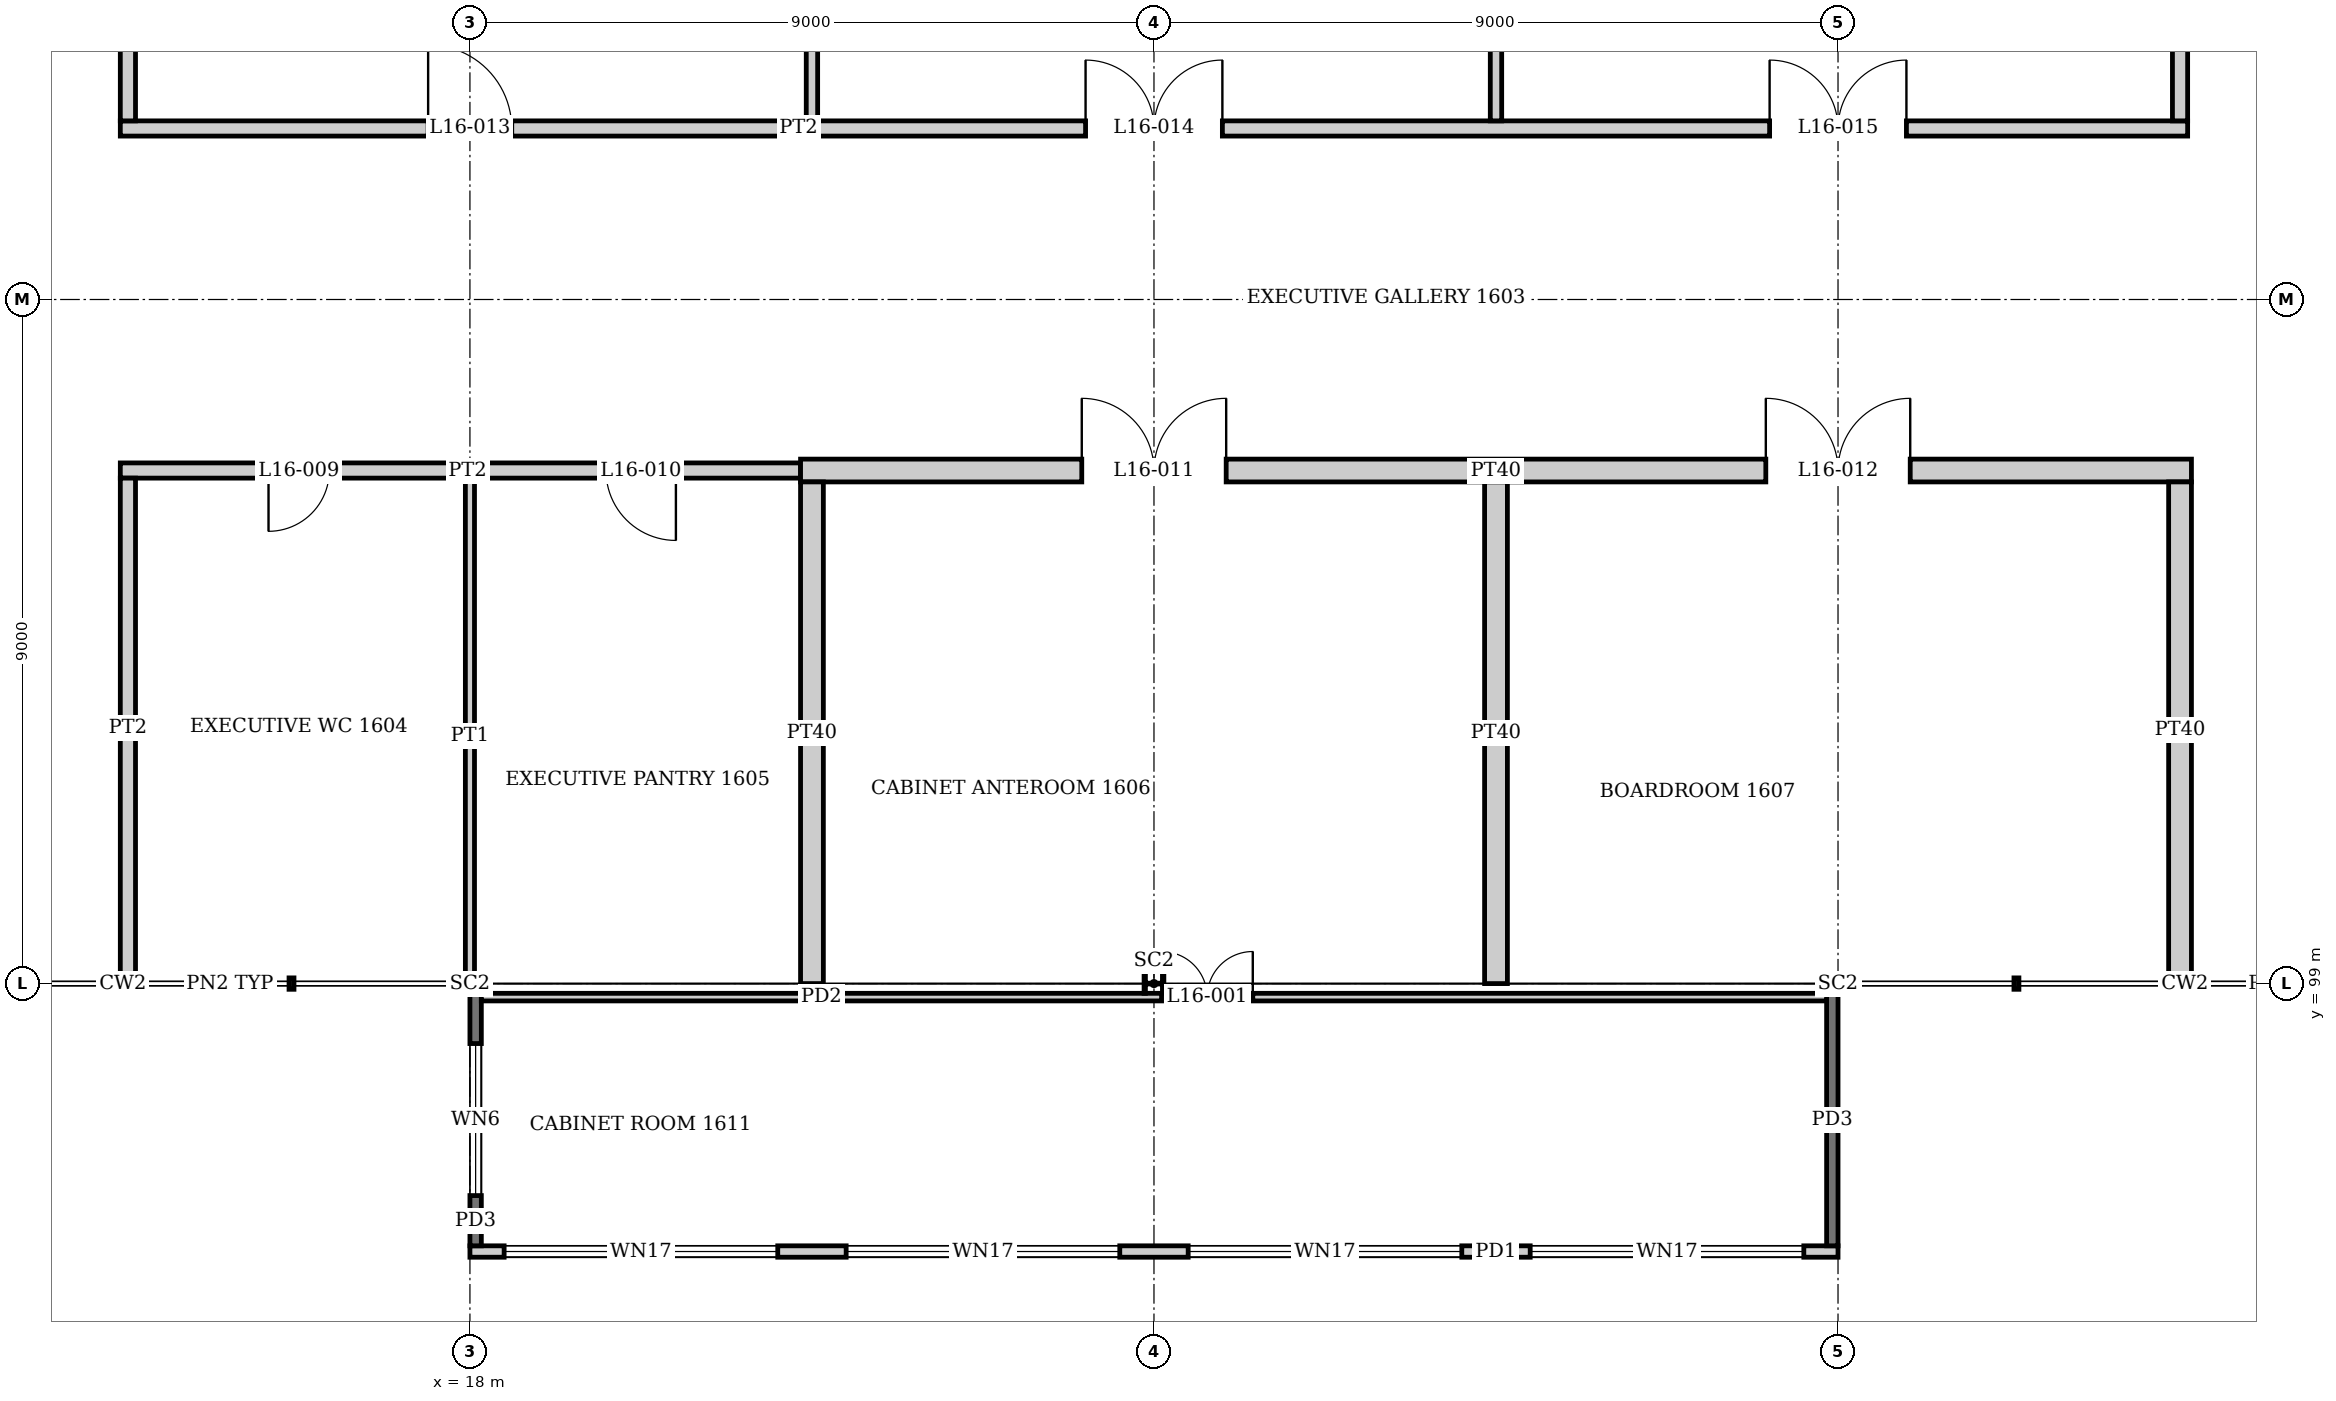
"""IFC4 building model, lengths in metres.
Left out: names, types, materials, properties, quantities, classifications, styles, units other than length and angle.
Written with IfcOpenShell. Run it as: python <this file> out.ifc"""

import sys

from ifc_helpers import new_model, si_unit, direction, frame, frame_2d, origin, origin_2d, place, context, subcontext, project, spatial, rectangle, i_section, extrude, element, fill, save


model = new_model("IFC4")
c1 = context("Model", 3, precision=1e-05, world=origin(), true_north=direction((0.0, 1.0)))
c2 = subcontext(c1, "Body", "Model", "MODEL_VIEW")
j1 = project(units=[si_unit("LENGTHUNIT", "METRE"), si_unit("PLANEANGLEUNIT", "RADIAN")], contexts=[c1])
p1 = place(None, origin())
s1 = spatial("IfcSite", under=j1, at=p1, CompositionType="ELEMENT")
p2 = place(p1, origin())
s2 = spatial("IfcBuilding", under=s1, at=p2, CompositionType="ELEMENT")
p3 = place(p2, frame((0.0, 0.0, 67.2)))
s3 = spatial("IfcBuildingStorey", under=s2, at=p3, CompositionType="ELEMENT", Elevation=67.2)
for number, where, z_axis, x_axis in (
    (1, (18.0, 99.0, 0.0), (0.0, 0.0, 1.0), (0.0, 1.0, 0.0)),
    (2, (27.0, 99.0, 0.0), (0.0, 0.0, 1.0), (0.0, 1.0, 0.0)),
    (3, (36.0, 99.0, 0.0), (0.0, 0.0, 1.0), (0.0, 1.0, 0.0)),
):
    element("IfcColumn", number, at=place(p3, frame(where, z_axis=z_axis, x_axis=x_axis)), inside=s3, PredefinedType="COLUMN", context=c2, shape_type="SweptSolid", body=[
        extrude(i_section(OverallWidth=0.256, OverallDepth=0.26, WebThickness=0.01, FlangeThickness=0.017, at=origin_2d()), origin(), (0.0, 0.0, 1.0), 4.0),
    ])
p4 = place(p3, frame((18.0, 95.475, 0.0), z_axis=(0.0, 0.0, 1.0), x_axis=(1.0, 0.0, 0.0)))
e4 = element("IfcWall", 4, at=p4, inside=s3, PredefinedType="SOLIDWALL", context=c2, shape_type="SweptSolid", body=[
    extrude(rectangle(XDim=18.0, YDim=0.15, at=frame_2d((9.0, 0.0))), origin(), (0.0, 0.0, 1.0), 2.6),
])
p5 = place(p4, frame((0.45, 0.0, 0.6)))
e5 = element("IfcOpeningElement", 5, at=p5, cuts=e4, PredefinedType="OPENING", context=c2, shape_type="SweptSolid", body=[
    extrude(rectangle(XDim=3.6, YDim=1.8, at=frame_2d((1.8, 0.9))), frame((0.0, 0.085, 0.0), z_axis=(0.0, -1.0, 0.0), x_axis=(1.0, 0.0, 0.0)), (0.0, 0.0, 1.0), 0.17),
])
p6 = place(p4, frame((4.95, 0.0, 0.6)))
e6 = element("IfcOpeningElement", 6, at=p6, cuts=e4, PredefinedType="OPENING", context=c2, shape_type="SweptSolid", body=[
    extrude(rectangle(XDim=3.6, YDim=1.8, at=frame_2d((1.8, 0.9))), frame((0.0, 0.085, 0.0), z_axis=(0.0, -1.0, 0.0), x_axis=(1.0, 0.0, 0.0)), (0.0, 0.0, 1.0), 0.17),
])
p7 = place(p4, frame((9.45, 0.0, 0.6)))
e7 = element("IfcOpeningElement", 7, at=p7, cuts=e4, PredefinedType="OPENING", context=c2, shape_type="SweptSolid", body=[
    extrude(rectangle(XDim=3.6, YDim=1.8, at=frame_2d((1.8, 0.9))), frame((0.0, 0.085, 0.0), z_axis=(0.0, -1.0, 0.0), x_axis=(1.0, 0.0, 0.0)), (0.0, 0.0, 1.0), 0.17),
])
p8 = place(p4, frame((13.95, 0.0, 0.6)))
e8 = element("IfcOpeningElement", 8, at=p8, cuts=e4, PredefinedType="OPENING", context=c2, shape_type="SweptSolid", body=[
    extrude(rectangle(XDim=3.6, YDim=1.8, at=frame_2d((1.8, 0.9))), frame((0.0, 0.085, 0.0), z_axis=(0.0, -1.0, 0.0), x_axis=(1.0, 0.0, 0.0)), (0.0, 0.0, 1.0), 0.17),
])
p9 = place(p3, frame((18.075, 95.55, -0.15), z_axis=(0.0, 0.0, 1.0), x_axis=(0.0, 1.0, 0.0)))
e9 = element("IfcWall", 9, at=p9, inside=s3, PredefinedType="SOLIDWALL", context=c2, shape_type="SweptSolid", body=[
    extrude(rectangle(XDim=3.322, YDim=0.15, at=frame_2d((1.661, 0.0))), origin(), (0.0, 0.0, 1.0), 2.75),
])
p10 = place(p9, frame((0.661, 0.0, 1.05)))
e10 = element("IfcOpeningElement", 10, at=p10, cuts=e9, PredefinedType="OPENING", context=c2, shape_type="SweptSolid", body=[
    extrude(rectangle(XDim=2.0, YDim=1.4, at=frame_2d((1.0, 0.7))), frame((0.0, 0.085, 0.0), z_axis=(0.0, -1.0, 0.0), x_axis=(1.0, 0.0, 0.0)), (0.0, 0.0, 1.0), 0.17),
])
p11 = place(p3, frame((35.925, 95.55, -0.15), z_axis=(0.0, 0.0, 1.0), x_axis=(0.0, 1.0, 0.0)))
e11 = element("IfcWall", 11, at=p11, inside=s3, PredefinedType="SOLIDWALL", context=c2, shape_type="SweptSolid", body=[
    extrude(rectangle(XDim=3.322, YDim=0.15, at=frame_2d((1.661, 0.0))), origin(), (0.0, 0.0, 1.0), 2.75),
])
p12 = place(p3, frame((18.15, 98.822, 0.0), z_axis=(0.0, 0.0, 1.0), x_axis=(1.0, 0.0, 0.0)))
e12 = element("IfcWall", 12, at=p12, inside=s3, PredefinedType="PARTITIONING", context=c2, shape_type="SweptSolid", body=[
    extrude(rectangle(XDim=17.7, YDim=0.1, at=frame_2d((8.85, 0.0))), origin(), (0.0, 0.0, 1.0), 2.6),
])
p13 = place(p12, frame((8.95, 0.0, 0.0)))
e13 = element("IfcOpeningElement", 13, at=p13, cuts=e12, PredefinedType="OPENING", context=c2, shape_type="SweptSolid", body=[
    extrude(rectangle(XDim=1.2, YDim=2.1, at=frame_2d((0.6, 1.05))), frame((0.0, 0.06, 0.0), z_axis=(0.0, -1.0, 0.0), x_axis=(1.0, 0.0, 0.0)), (0.0, 0.0, 1.0), 0.12),
])
p14 = place(p3, frame((13.4, 105.75, 0.0), z_axis=(0.0, 0.0, 1.0), x_axis=(1.0, 0.0, 0.0)))
e14 = element("IfcWall", 14, at=p14, inside=s3, PredefinedType="PARTITIONING", context=c2, shape_type="SweptSolid", body=[
    extrude(rectangle(XDim=8.95, YDim=0.2, at=frame_2d((4.475, 0.0))), origin(), (0.0, 0.0, 1.0), 2.9),
])
p15 = place(p14, frame((1.95, 0.0, 0.0)))
e15 = element("IfcOpeningElement", 15, at=p15, cuts=e14, PredefinedType="OPENING", context=c2, shape_type="SweptSolid", body=[
    extrude(rectangle(XDim=0.8, YDim=2.1, at=frame_2d((0.4, 1.05))), frame((0.0, 0.11, 0.0), z_axis=(0.0, -1.0, 0.0), x_axis=(1.0, 0.0, 0.0)), (0.0, 0.0, 1.0), 0.22),
])
p16 = place(p14, frame((6.39, 0.0, 0.0)))
e16 = element("IfcOpeningElement", 16, at=p16, cuts=e14, PredefinedType="OPENING", context=c2, shape_type="SweptSolid", body=[
    extrude(rectangle(XDim=0.92, YDim=2.1, at=frame_2d((0.46, 1.05))), frame((0.0, 0.11, 0.0), z_axis=(0.0, -1.0, 0.0), x_axis=(1.0, 0.0, 0.0)), (0.0, 0.0, 1.0), 0.22),
])
p17 = place(p3, frame((22.35, 105.75, 0.0), z_axis=(0.0, 0.0, 1.0), x_axis=(1.0, 0.0, 0.0)))
e17 = element("IfcWall", 17, at=p17, inside=s3, PredefinedType="PARTITIONING", context=c2, shape_type="SweptSolid", body=[
    extrude(rectangle(XDim=18.3, YDim=0.3, at=frame_2d((9.15, 0.0))), origin(), (0.0, 0.0, 1.0), 2.9),
])
p18 = place(p17, frame((3.7, 0.0, 0.0)))
e18 = element("IfcOpeningElement", 18, at=p18, cuts=e17, PredefinedType="OPENING", context=c2, shape_type="SweptSolid", body=[
    extrude(rectangle(XDim=1.9, YDim=2.4, at=frame_2d((0.95, 1.2))), frame((0.0, 0.16, 0.0), z_axis=(0.0, -1.0, 0.0), x_axis=(1.0, 0.0, 0.0)), (0.0, 0.0, 1.0), 0.32),
])
p19 = place(p17, frame((12.7, 0.0, 0.0)))
e19 = element("IfcOpeningElement", 19, at=p19, cuts=e17, PredefinedType="OPENING", context=c2, shape_type="SweptSolid", body=[
    extrude(rectangle(XDim=1.9, YDim=2.4, at=frame_2d((0.95, 1.2))), frame((0.0, 0.16, 0.0), z_axis=(0.0, -1.0, 0.0), x_axis=(1.0, 0.0, 0.0)), (0.0, 0.0, 1.0), 0.32),
])
p20 = place(p3, frame((13.4, 110.25, 0.0), z_axis=(0.0, 0.0, 1.0), x_axis=(1.0, 0.0, 0.0)))
e20 = element("IfcWall", 20, at=p20, inside=s3, PredefinedType="PARTITIONING", context=c2, shape_type="SweptSolid", body=[
    extrude(rectangle(XDim=27.2, YDim=0.2, at=frame_2d((13.6, 0.0))), origin(), (0.0, 0.0, 1.0), 2.9),
])
p21 = place(p20, frame((4.05, 0.0, 0.0)))
e21 = element("IfcOpeningElement", 21, at=p21, cuts=e20, PredefinedType="OPENING", context=c2, shape_type="SweptSolid", body=[
    extrude(rectangle(XDim=1.1, YDim=2.4, at=frame_2d((0.55, 1.2))), frame((0.0, 0.11, 0.0), z_axis=(0.0, -1.0, 0.0), x_axis=(1.0, 0.0, 0.0)), (0.0, 0.0, 1.0), 0.22),
])
p22 = place(p20, frame((12.7, 0.0, 0.0)))
e22 = element("IfcOpeningElement", 22, at=p22, cuts=e20, PredefinedType="OPENING", context=c2, shape_type="SweptSolid", body=[
    extrude(rectangle(XDim=1.8, YDim=2.1, at=frame_2d((0.9, 1.05))), frame((0.0, 0.11, 0.0), z_axis=(0.0, -1.0, 0.0), x_axis=(1.0, 0.0, 0.0)), (0.0, 0.0, 1.0), 0.22),
])
p23 = place(p20, frame((21.7, 0.0, 0.0)))
e23 = element("IfcOpeningElement", 23, at=p23, cuts=e20, PredefinedType="OPENING", context=c2, shape_type="SweptSolid", body=[
    extrude(rectangle(XDim=1.8, YDim=2.1, at=frame_2d((0.9, 1.05))), frame((0.0, 0.11, 0.0), z_axis=(0.0, -1.0, 0.0), x_axis=(1.0, 0.0, 0.0)), (0.0, 0.0, 1.0), 0.22),
])
p24 = place(p3, frame((13.5, 99.075, 0.0), z_axis=(0.0, 0.0, 1.0), x_axis=(0.0, 1.0, 0.0)))
e24 = element("IfcWall", 24, at=p24, inside=s3, PredefinedType="PARTITIONING", context=c2, shape_type="SweptSolid", body=[
    extrude(rectangle(XDim=6.575, YDim=0.2, at=frame_2d((3.288, 0.0))), origin(), (0.0, 0.0, 1.0), 2.9),
])
p25 = place(p3, frame((13.5, 110.35, 0.0), z_axis=(0.0, 0.0, 1.0), x_axis=(0.0, 1.0, 0.0)))
e25 = element("IfcWall", 25, at=p25, inside=s3, PredefinedType="PARTITIONING", context=c2, shape_type="SweptSolid", body=[
    extrude(rectangle(XDim=6.56, YDim=0.2, at=frame_2d((3.28, 0.0))), origin(), (0.0, 0.0, 1.0), 2.9),
])
p26 = place(p3, frame((18.0, 98.872, 0.0), z_axis=(0.0, 0.0, 1.0), x_axis=(0.0, 1.0, 0.0)))
e26 = element("IfcWall", 26, at=p26, inside=s3, PredefinedType="PARTITIONING", context=c2, shape_type="SweptSolid", body=[
    extrude(rectangle(XDim=6.778, YDim=0.12, at=frame_2d((3.389, 0.0))), origin(), (0.0, 0.0, 1.0), 2.9),
])
p27 = place(p3, frame((22.5, 99.0, 0.0), z_axis=(0.0, 0.0, 1.0), x_axis=(0.0, 1.0, 0.0)))
e27 = element("IfcWall", 27, at=p27, inside=s3, PredefinedType="PARTITIONING", context=c2, shape_type="SweptSolid", body=[
    extrude(rectangle(XDim=6.6, YDim=0.3, at=frame_2d((3.3, 0.0))), origin(), (0.0, 0.0, 1.0), 2.9),
])
p28 = place(p3, frame((22.5, 110.35, 0.0), z_axis=(0.0, 0.0, 1.0), x_axis=(0.0, 1.0, 0.0)))
e28 = element("IfcWall", 28, at=p28, inside=s3, PredefinedType="PARTITIONING", context=c2, shape_type="SweptSolid", body=[
    extrude(rectangle(XDim=6.65, YDim=0.15, at=frame_2d((3.325, 0.0))), origin(), (0.0, 0.0, 1.0), 2.9),
])
p29 = place(p3, frame((31.5, 99.0, 0.0), z_axis=(0.0, 0.0, 1.0), x_axis=(0.0, 1.0, 0.0)))
e29 = element("IfcWall", 29, at=p29, inside=s3, PredefinedType="PARTITIONING", context=c2, shape_type="SweptSolid", body=[
    extrude(rectangle(XDim=6.6, YDim=0.3, at=frame_2d((3.3, 0.0))), origin(), (0.0, 0.0, 1.0), 2.9),
])
p30 = place(p3, frame((31.5, 110.35, 0.0), z_axis=(0.0, 0.0, 1.0), x_axis=(0.0, 1.0, 0.0)))
e30 = element("IfcWall", 30, at=p30, inside=s3, PredefinedType="PARTITIONING", context=c2, shape_type="SweptSolid", body=[
    extrude(rectangle(XDim=6.65, YDim=0.15, at=frame_2d((3.325, 0.0))), origin(), (0.0, 0.0, 1.0), 2.9),
])
p31 = place(p3, frame((40.5, 99.075, 0.0), z_axis=(0.0, 0.0, 1.0), x_axis=(0.0, 1.0, 0.0)))
e31 = element("IfcWall", 31, at=p31, inside=s3, PredefinedType="PARTITIONING", context=c2, shape_type="SweptSolid", body=[
    extrude(rectangle(XDim=6.525, YDim=0.3, at=frame_2d((3.263, 0.0))), origin(), (0.0, 0.0, 1.0), 2.9),
])
p32 = place(p3, frame((40.5, 110.35, 0.0), z_axis=(0.0, 0.0, 1.0), x_axis=(0.0, 1.0, 0.0)))
e32 = element("IfcWall", 32, at=p32, inside=s3, PredefinedType="PARTITIONING", context=c2, shape_type="SweptSolid", body=[
    extrude(rectangle(XDim=6.56, YDim=0.2, at=frame_2d((3.28, 0.0))), origin(), (0.0, 0.0, 1.0), 2.9),
])
p33 = place(p5, origin())
e33 = element("IfcWindow", 33, at=p33, inside=s3, PartitioningType="SINGLE_PANEL", PredefinedType="WINDOW", context=c2, shape_type="SweptSolid", body=[
    extrude(rectangle(XDim=3.6, YDim=1.8, at=frame_2d((1.8, 0.9))), frame((0.0, 0.03, 0.0), z_axis=(0.0, -1.0, 0.0), x_axis=(1.0, 0.0, 0.0)), (0.0, 0.0, 1.0), 0.06),
])
fill(e5, e33)
p34 = place(p6, origin())
e34 = element("IfcWindow", 34, at=p34, inside=s3, PartitioningType="SINGLE_PANEL", PredefinedType="WINDOW", context=c2, shape_type="SweptSolid", body=[
    extrude(rectangle(XDim=3.6, YDim=1.8, at=frame_2d((1.8, 0.9))), frame((0.0, 0.03, 0.0), z_axis=(0.0, -1.0, 0.0), x_axis=(1.0, 0.0, 0.0)), (0.0, 0.0, 1.0), 0.06),
])
fill(e6, e34)
p35 = place(p7, origin())
e35 = element("IfcWindow", 35, at=p35, inside=s3, PartitioningType="SINGLE_PANEL", PredefinedType="WINDOW", context=c2, shape_type="SweptSolid", body=[
    extrude(rectangle(XDim=3.6, YDim=1.8, at=frame_2d((1.8, 0.9))), frame((0.0, 0.03, 0.0), z_axis=(0.0, -1.0, 0.0), x_axis=(1.0, 0.0, 0.0)), (0.0, 0.0, 1.0), 0.06),
])
fill(e7, e35)
p36 = place(p8, origin())
e36 = element("IfcWindow", 36, at=p36, inside=s3, PartitioningType="SINGLE_PANEL", PredefinedType="WINDOW", context=c2, shape_type="SweptSolid", body=[
    extrude(rectangle(XDim=3.6, YDim=1.8, at=frame_2d((1.8, 0.9))), frame((0.0, 0.03, 0.0), z_axis=(0.0, -1.0, 0.0), x_axis=(1.0, 0.0, 0.0)), (0.0, 0.0, 1.0), 0.06),
])
fill(e8, e36)
p37 = place(p10, origin())
e37 = element("IfcWindow", 37, at=p37, inside=s3, PartitioningType="SINGLE_PANEL", PredefinedType="WINDOW", context=c2, shape_type="SweptSolid", body=[
    extrude(rectangle(XDim=2.0, YDim=1.4, at=frame_2d((1.0, 0.7))), frame((0.0, 0.03, 0.0), z_axis=(0.0, -1.0, 0.0), x_axis=(1.0, 0.0, 0.0)), (0.0, 0.0, 1.0), 0.06),
])
fill(e10, e37)
p38 = place(p13, origin())
e38 = element("IfcDoor", 38, at=p38, inside=s3, OperationType="DOUBLE_DOOR_SINGLE_SWING", PredefinedType="DOOR", context=c2, shape_type="SweptSolid", body=[
    extrude(rectangle(XDim=1.2, YDim=2.1, at=frame_2d((0.6, 1.05))), frame((0.0, 0.025, 0.0), z_axis=(0.0, -1.0, 0.0), x_axis=(1.0, 0.0, 0.0)), (0.0, 0.0, 1.0), 0.05),
])
fill(e13, e38)
p39 = place(p15, frame((0.8, 0.0, 0.0), z_axis=(0.0, 0.0, 1.0), x_axis=(-1.0, 0.0, 0.0)))
e39 = element("IfcDoor", 39, at=p39, inside=s3, OperationType="SINGLE_SWING_RIGHT", PredefinedType="DOOR", context=c2, shape_type="SweptSolid", body=[
    extrude(rectangle(XDim=0.8, YDim=2.1, at=frame_2d((0.4, 1.05))), frame((0.0, 0.025, 0.0), z_axis=(0.0, -1.0, 0.0), x_axis=(1.0, 0.0, 0.0)), (0.0, 0.0, 1.0), 0.05),
])
fill(e15, e39)
p40 = place(p16, frame((0.92, 0.0, 0.0), z_axis=(0.0, 0.0, 1.0), x_axis=(-1.0, 0.0, 0.0)))
e40 = element("IfcDoor", 40, at=p40, inside=s3, OperationType="SINGLE_SWING_LEFT", PredefinedType="DOOR", context=c2, shape_type="SweptSolid", body=[
    extrude(rectangle(XDim=0.92, YDim=2.1, at=frame_2d((0.46, 1.05))), frame((0.0, 0.025, 0.0), z_axis=(0.0, -1.0, 0.0), x_axis=(1.0, 0.0, 0.0)), (0.0, 0.0, 1.0), 0.05),
])
fill(e16, e40)
p41 = place(p18, origin())
e41 = element("IfcDoor", 41, at=p41, inside=s3, OperationType="DOUBLE_DOOR_SINGLE_SWING", PredefinedType="DOOR", context=c2, shape_type="SweptSolid", body=[
    extrude(rectangle(XDim=1.9, YDim=2.4, at=frame_2d((0.95, 1.2))), frame((0.0, 0.025, 0.0), z_axis=(0.0, -1.0, 0.0), x_axis=(1.0, 0.0, 0.0)), (0.0, 0.0, 1.0), 0.05),
])
fill(e18, e41)
p42 = place(p19, origin())
e42 = element("IfcDoor", 42, at=p42, inside=s3, OperationType="DOUBLE_DOOR_SINGLE_SWING", PredefinedType="DOOR", context=c2, shape_type="SweptSolid", body=[
    extrude(rectangle(XDim=1.9, YDim=2.4, at=frame_2d((0.95, 1.2))), frame((0.0, 0.025, 0.0), z_axis=(0.0, -1.0, 0.0), x_axis=(1.0, 0.0, 0.0)), (0.0, 0.0, 1.0), 0.05),
])
fill(e19, e42)
p43 = place(p21, origin())
e43 = element("IfcDoor", 43, at=p43, inside=s3, OperationType="SINGLE_SWING_LEFT", PredefinedType="DOOR", context=c2, shape_type="SweptSolid", body=[
    extrude(rectangle(XDim=1.1, YDim=2.4, at=frame_2d((0.55, 1.2))), frame((0.0, 0.025, 0.0), z_axis=(0.0, -1.0, 0.0), x_axis=(1.0, 0.0, 0.0)), (0.0, 0.0, 1.0), 0.05),
])
fill(e21, e43)
p44 = place(p22, origin())
e44 = element("IfcDoor", 44, at=p44, inside=s3, OperationType="DOUBLE_DOOR_SINGLE_SWING", PredefinedType="DOOR", context=c2, shape_type="SweptSolid", body=[
    extrude(rectangle(XDim=1.8, YDim=2.1, at=frame_2d((0.9, 1.05))), frame((0.0, 0.025, 0.0), z_axis=(0.0, -1.0, 0.0), x_axis=(1.0, 0.0, 0.0)), (0.0, 0.0, 1.0), 0.05),
])
fill(e22, e44)
p45 = place(p23, origin())
e45 = element("IfcDoor", 45, at=p45, inside=s3, OperationType="DOUBLE_DOOR_SINGLE_SWING", PredefinedType="DOOR", context=c2, shape_type="SweptSolid", body=[
    extrude(rectangle(XDim=1.8, YDim=2.1, at=frame_2d((0.9, 1.05))), frame((0.0, 0.025, 0.0), z_axis=(0.0, -1.0, 0.0), x_axis=(1.0, 0.0, 0.0)), (0.0, 0.0, 1.0), 0.05),
])
fill(e23, e45)
save(model, sys.argv[1])
